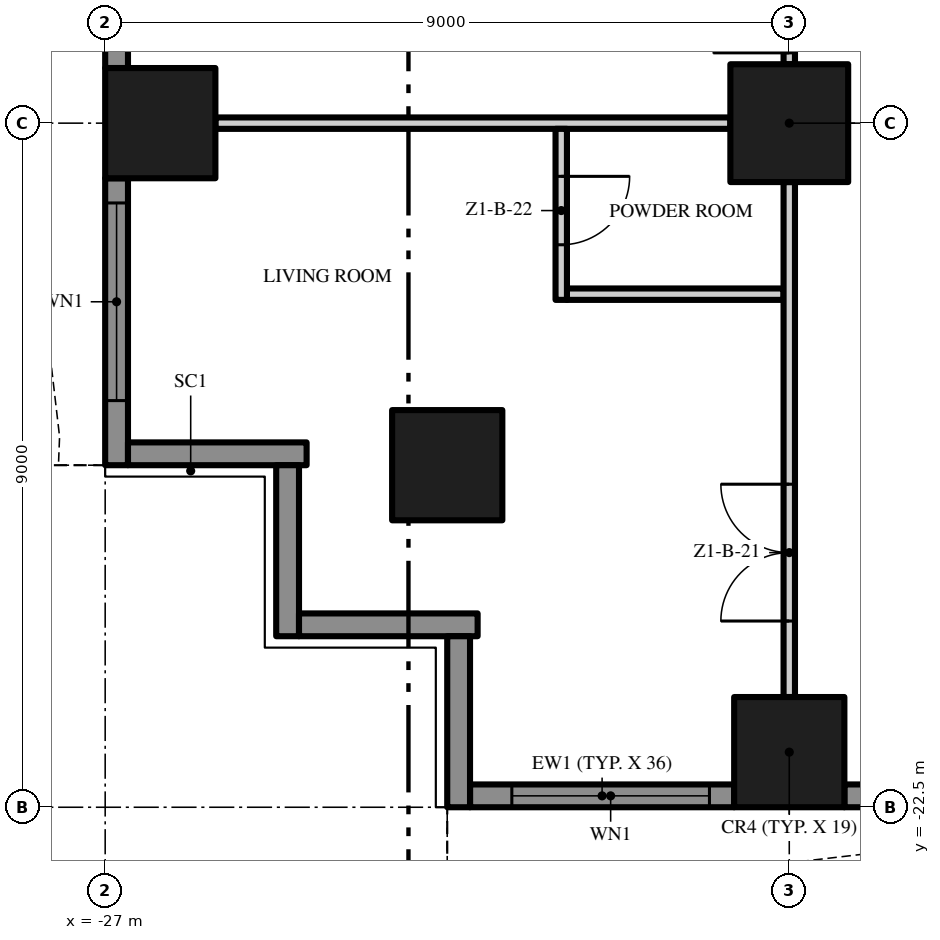
"""IFC4 building model, lengths in metres.
Left out: names, types, materials, properties, quantities, classifications, styles, units other than length and angle.
Written with IfcOpenShell. Run it as: python <this file> out.ifc"""

import sys

from ifc_helpers import new_model, si_unit, direction, frame, frame_2d, origin, origin_2d, place, context, subcontext, project, spatial, polyline, rectangle, outline, extrude, element, fill, save


model = new_model("IFC4")
c1 = context("Model", 3, precision=1e-05, world=origin(), true_north=direction((0.0, 1.0)))
c2 = subcontext(c1, "Body", "Model", "MODEL_VIEW")
j1 = project(units=[si_unit("LENGTHUNIT", "METRE"), si_unit("PLANEANGLEUNIT", "RADIAN")], contexts=[c1])
p1 = place(None, origin())
s1 = spatial("IfcSite", under=j1, at=p1, CompositionType="ELEMENT")
p2 = place(p1, origin())
s2 = spatial("IfcBuilding", under=s1, at=p2, CompositionType="ELEMENT")
p3 = place(p2, frame((0.0, 0.0, 26.4)))
s3 = spatial("IfcBuildingStorey", under=s2, at=p3, CompositionType="ELEMENT", Elevation=26.4)
p4 = place(p3, frame((-18.0, -13.5, 0.0), z_axis=(0.0, 0.0, 1.0), x_axis=(1.0, 0.0, 0.0)))
e1 = element("IfcColumn", 1, at=p4, inside=s3, PredefinedType="COLUMN", context=c2, shape_type="SweptSolid", body=[
    extrude(rectangle(XDim=1.55, YDim=1.55, at=origin_2d()), origin(), (0.0, 0.0, 1.0), 3.5),
])
for number, where, z_axis, x_axis in (
    (2, (-18.0, -21.775, 0.0), (0.0, 0.0, 1.0), (1.0, 0.0, 0.0)),
    (3, (-26.275, -13.5, 0.0), (0.0, 0.0, 1.0), (1.0, 0.0, 0.0)),
    (4, (-22.5, -18.0, 0.0), (0.0, 0.0, 1.0), (1.0, 0.0, 0.0)),
):
    element("IfcColumn", number, at=place(p3, frame(where, z_axis=z_axis, x_axis=x_axis)), inside=s3, PredefinedType="COLUMN", context=c2, shape_type="SweptSolid", body=[
        extrude(rectangle(XDim=1.45, YDim=1.45, at=origin_2d()), origin(), (0.0, 0.0, 1.0), 3.5),
    ])
p5 = place(p3, frame((-18.725, -22.35, 0.0), z_axis=(0.0, 0.0, 1.0), x_axis=(-1.0, 0.0, 0.0)))
e5 = element("IfcWall", 5, at=p5, inside=s3, PredefinedType="SOLIDWALL", context=c2, shape_type="SweptSolid", body=[
    extrude(rectangle(XDim=3.475, YDim=0.3, at=frame_2d((1.738, 0.0))), origin(), (0.0, 0.0, 1.0), 3.5),
])
p6 = place(p5, frame((0.325, 0.0, 0.45)))
e6 = element("IfcOpeningElement", 6, at=p6, cuts=e5, PredefinedType="OPENING", context=c2, shape_type="SweptSolid", body=[
    extrude(rectangle(XDim=2.6, YDim=2.65, at=frame_2d((1.3, 1.325))), frame((0.0, 0.16, 0.0), z_axis=(0.0, -1.0, 0.0), x_axis=(1.0, 0.0, 0.0)), (0.0, 0.0, 1.0), 0.32),
])
p7 = place(p3, frame((-9.725, -22.35, 0.0), z_axis=(0.0, 0.0, 1.0), x_axis=(-1.0, 0.0, 0.0)))
e7 = element("IfcWall", 7, at=p7, inside=s3, PredefinedType="SOLIDWALL", context=c2, shape_type="SweptSolid", body=[
    extrude(rectangle(XDim=7.55, YDim=0.3, at=frame_2d((3.775, 0.0))), origin(), (0.0, 0.0, 1.0), 3.5),
])
p8 = place(p7, frame((4.625, 0.0, 0.45)))
e8 = element("IfcOpeningElement", 8, at=p8, cuts=e7, PredefinedType="OPENING", context=c2, shape_type="SweptSolid", body=[
    extrude(rectangle(XDim=2.6, YDim=2.65, at=frame_2d((1.3, 1.325))), frame((0.0, 0.16, 0.0), z_axis=(0.0, -1.0, 0.0), x_axis=(1.0, 0.0, 0.0)), (0.0, 0.0, 1.0), 0.32),
])
p9 = place(p7, frame((0.325, 0.0, 0.0)))
e9 = element("IfcOpeningElement", 9, at=p9, cuts=e7, PredefinedType="OPENING", context=c2, shape_type="SweptSolid", body=[
    extrude(rectangle(XDim=2.6, YDim=2.4, at=frame_2d((1.3, 1.2))), frame((0.0, 0.16, 0.0), z_axis=(0.0, -1.0, 0.0), x_axis=(1.0, 0.0, 0.0)), (0.0, 0.0, 1.0), 0.32),
])
p10 = place(p3, frame((-26.85, -12.775, 0.0), z_axis=(0.0, 0.0, 1.0), x_axis=(0.0, 1.0, 0.0)))
e10 = element("IfcWall", 10, at=p10, inside=s3, PredefinedType="SOLIDWALL", context=c2, shape_type="SweptSolid", body=[
    extrude(rectangle(XDim=7.55, YDim=0.3, at=frame_2d((3.775, 0.0))), origin(), (0.0, 0.0, 1.0), 3.5),
])
p11 = place(p10, frame((4.625, 0.0, 0.45)))
e11 = element("IfcOpeningElement", 11, at=p11, cuts=e10, PredefinedType="OPENING", context=c2, shape_type="SweptSolid", body=[
    extrude(rectangle(XDim=2.6, YDim=2.65, at=frame_2d((1.3, 1.325))), frame((0.0, 0.16, 0.0), z_axis=(0.0, -1.0, 0.0), x_axis=(1.0, 0.0, 0.0)), (0.0, 0.0, 1.0), 0.32),
])
p12 = place(p10, frame((0.325, 0.0, 0.0)))
e12 = element("IfcOpeningElement", 12, at=p12, cuts=e10, PredefinedType="OPENING", context=c2, shape_type="SweptSolid", body=[
    extrude(rectangle(XDim=2.6, YDim=2.4, at=frame_2d((1.3, 1.2))), frame((0.0, 0.16, 0.0), z_axis=(0.0, -1.0, 0.0), x_axis=(1.0, 0.0, 0.0)), (0.0, 0.0, 1.0), 0.32),
])
p13 = place(p3, frame((-26.85, -18.0, 0.0), z_axis=(0.0, 0.0, 1.0), x_axis=(0.0, 1.0, 0.0)))
e13 = element("IfcWall", 13, at=p13, inside=s3, PredefinedType="SOLIDWALL", context=c2, shape_type="SweptSolid", body=[
    extrude(rectangle(XDim=3.775, YDim=0.3, at=frame_2d((1.887, 0.0))), origin(), (0.0, 0.0, 1.0), 3.5),
])
p14 = place(p13, frame((0.85, 0.0, 0.45)))
e14 = element("IfcOpeningElement", 14, at=p14, cuts=e13, PredefinedType="OPENING", context=c2, shape_type="SweptSolid", body=[
    extrude(rectangle(XDim=2.6, YDim=2.65, at=frame_2d((1.3, 1.325))), frame((0.0, 0.16, 0.0), z_axis=(0.0, -1.0, 0.0), x_axis=(1.0, 0.0, 0.0)), (0.0, 0.0, 1.0), 0.32),
])
p15 = place(p3, frame((-24.35, -17.85, 0.0), z_axis=(0.0, 0.0, 1.0), x_axis=(-1.0, 0.0, 0.0)))
e15 = element("IfcWall", 15, at=p15, inside=s3, PredefinedType="SOLIDWALL", context=c2, shape_type="SweptSolid", body=[
    extrude(rectangle(XDim=2.35, YDim=0.3, at=frame_2d((1.175, 0.0))), origin(), (0.0, 0.0, 1.0), 3.5),
])
p16 = place(p3, frame((-24.6, -20.25, 0.0), z_axis=(0.0, 0.0, 1.0), x_axis=(0.0, 1.0, 0.0)))
e16 = element("IfcWall", 16, at=p16, inside=s3, PredefinedType="SOLIDWALL", context=c2, shape_type="SweptSolid", body=[
    extrude(rectangle(XDim=2.25, YDim=0.3, at=frame_2d((1.125, 0.0))), origin(), (0.0, 0.0, 1.0), 3.5),
])
p17 = place(p3, frame((-22.1, -20.1, 0.0), z_axis=(0.0, 0.0, 1.0), x_axis=(-1.0, 0.0, 0.0)))
e17 = element("IfcWall", 17, at=p17, inside=s3, PredefinedType="SOLIDWALL", context=c2, shape_type="SweptSolid", body=[
    extrude(rectangle(XDim=2.35, YDim=0.3, at=frame_2d((1.175, 0.0))), origin(), (0.0, 0.0, 1.0), 3.5),
])
p18 = place(p3, frame((-22.35, -22.5, 0.0), z_axis=(0.0, 0.0, 1.0), x_axis=(0.0, 1.0, 0.0)))
e18 = element("IfcWall", 18, at=p18, inside=s3, PredefinedType="SOLIDWALL", context=c2, shape_type="SweptSolid", body=[
    extrude(rectangle(XDim=2.25, YDim=0.3, at=frame_2d((1.125, 0.0))), origin(), (0.0, 0.0, 1.0), 3.5),
])
p19 = place(p3, origin())
e19 = element("IfcWall", 19, at=p19, inside=s3, PredefinedType="USERDEFINED", context=c2, shape_type="SweptSolid", body=[
    extrude(outline(polyline([(-22.5, -25.149), (-21.0, -24.488), (-19.5, -23.755), (-18.0, -23.231), (-16.875, -23.1), (-16.5, -23.115), (-15.0, -23.451), (-13.5, -24.112), (-12.0, -24.845), (-10.5, -25.369), (-9.375, -25.5), (-9.0, -25.485), (-7.5, -25.149), (-6.0, -24.488), (-4.5, -23.755), (-3.0, -23.231), (-1.875, -23.1), (-1.5, -23.115), (0.0, -23.451), (1.5, -24.112), (3.0, -24.845), (4.5, -25.369), (5.625, -25.5), (6.0, -25.485), (7.5, -25.149), (9.0, -24.488), (10.5, -23.755), (12.0, -23.231), (13.125, -23.1), (13.5, -23.115), (15.0, -23.451), (16.5, -24.112), (18.0, -24.845), (19.5, -25.369), (20.625, -25.5), (21.0, -25.485), (22.5, -25.149), (22.445, -24.905), (20.967, -25.236), (20.635, -25.249), (19.556, -25.124), (18.096, -24.614), (16.605, -23.885), (15.079, -23.213), (13.533, -22.866), (13.115, -22.849), (11.944, -22.986), (10.404, -23.524), (8.895, -24.261), (7.421, -24.91), (5.967, -25.236), (5.635, -25.249), (4.556, -25.124), (3.096, -24.614), (1.605, -23.885), (0.079, -23.213), (-1.467, -22.866), (-1.885, -22.849), (-3.056, -22.986), (-4.596, -23.524), (-6.105, -24.261), (-7.579, -24.91), (-9.033, -25.236), (-9.365, -25.249), (-10.444, -25.124), (-11.904, -24.614), (-13.395, -23.885), (-14.921, -23.213), (-16.467, -22.866), (-16.885, -22.849), (-18.056, -22.986), (-19.596, -23.524), (-21.105, -24.261), (-22.601, -24.92), (-22.5, -25.149)])), origin(), (0.0, 0.0, 1.0), 0.9),
])
p20 = place(p3, origin())
e20 = element("IfcWall", 20, at=p20, inside=s3, PredefinedType="USERDEFINED", context=c2, shape_type="SweptSolid", body=[
    extrude(outline(polyline([(-29.649, 18.0), (-28.988, 16.5), (-28.255, 15.0), (-27.731, 13.5), (-27.6, 12.375), (-27.615, 12.0), (-27.951, 10.5), (-28.612, 9.0), (-29.345, 7.5), (-29.869, 6.0), (-30.0, 4.875), (-29.985, 4.5), (-29.649, 3.0), (-28.988, 1.5), (-28.255, 0.0), (-27.731, -1.5), (-27.6, -2.625), (-27.615, -3.0), (-27.951, -4.5), (-28.612, -6.0), (-29.345, -7.5), (-29.869, -9.0), (-30.0, -10.125), (-29.985, -10.5), (-29.649, -12.0), (-28.988, -13.5), (-28.255, -15.0), (-27.731, -16.5), (-27.6, -17.625), (-27.615, -18.0), (-27.365, -18.01), (-27.349, -17.615), (-27.486, -16.444), (-28.024, -14.904), (-28.761, -13.395), (-29.41, -11.921), (-29.736, -10.467), (-29.749, -10.135), (-29.624, -9.056), (-29.114, -7.596), (-28.385, -6.105), (-27.713, -4.579), (-27.366, -3.033), (-27.349, -2.615), (-27.486, -1.444), (-28.024, 0.096), (-28.761, 1.605), (-29.41, 3.079), (-29.736, 4.533), (-29.749, 4.865), (-29.624, 5.944), (-29.114, 7.404), (-28.385, 8.895), (-27.713, 10.421), (-27.366, 11.967), (-27.349, 12.385), (-27.486, 13.556), (-28.024, 15.096), (-28.761, 16.605), (-29.42, 18.101), (-29.649, 18.0)])), origin(), (0.0, 0.0, 1.0), 0.9),
])
p21 = place(p3, frame((-20.925, -15.75, 0.0), z_axis=(0.0, 0.0, 1.0), x_axis=(1.0, 0.0, 0.0)))
e21 = element("IfcWall", 21, at=p21, inside=s3, PredefinedType="PARTITIONING", context=c2, shape_type="SweptSolid", body=[
    extrude(rectangle(XDim=2.85, YDim=0.15, at=frame_2d((1.425, 0.0))), origin(), (0.0, 0.0, 1.0), 3.5),
])
p22 = place(p3, frame((-25.55, -13.5, 0.0), z_axis=(0.0, 0.0, 1.0), x_axis=(1.0, 0.0, 0.0)))
e22 = element("IfcWall", 22, at=p22, inside=s3, PredefinedType="PARTITIONING", context=c2, shape_type="SweptSolid", body=[
    extrude(rectangle(XDim=6.775, YDim=0.15, at=frame_2d((3.388, 0.0))), origin(), (0.0, 0.0, 1.0), 3.5),
])
p23 = place(p3, frame((-21.0, -13.575, 0.0), z_axis=(0.0, 0.0, 1.0), x_axis=(0.0, -1.0, 0.0)))
e23 = element("IfcWall", 23, at=p23, inside=s3, PredefinedType="PARTITIONING", context=c2, shape_type="SweptSolid", body=[
    extrude(rectangle(XDim=2.25, YDim=0.15, at=frame_2d((1.125, 0.0))), origin(), (0.0, 0.0, 1.0), 3.5),
])
p24 = place(p23, frame((0.625, 0.0, 0.0)))
e24 = element("IfcOpeningElement", 24, at=p24, cuts=e23, PredefinedType="OPENING", context=c2, shape_type="SweptSolid", body=[
    extrude(rectangle(XDim=0.9, YDim=2.1, at=frame_2d((0.45, 1.05))), frame((0.0, 0.085, 0.0), z_axis=(0.0, -1.0, 0.0), x_axis=(1.0, 0.0, 0.0)), (0.0, 0.0, 1.0), 0.17),
])
p25 = place(p3, frame((-18.0, -21.05, 0.0), z_axis=(0.0, 0.0, 1.0), x_axis=(0.0, 1.0, 0.0)))
e25 = element("IfcWall", 25, at=p25, inside=s3, PredefinedType="PARTITIONING", context=c2, shape_type="SweptSolid", body=[
    extrude(rectangle(XDim=6.775, YDim=0.15, at=frame_2d((3.388, 0.0))), origin(), (0.0, 0.0, 1.0), 3.5),
])
p26 = place(p25, frame((1.0, 0.0, 0.0)))
e26 = element("IfcOpeningElement", 26, at=p26, cuts=e25, PredefinedType="OPENING", context=c2, shape_type="SweptSolid", body=[
    extrude(rectangle(XDim=1.8, YDim=2.4, at=frame_2d((0.9, 1.2))), frame((0.0, 0.085, 0.0), z_axis=(0.0, -1.0, 0.0), x_axis=(1.0, 0.0, 0.0)), (0.0, 0.0, 1.0), 0.17),
])
p27 = place(p3, frame((-18.0, -12.725, 0.0), z_axis=(0.0, 0.0, 1.0), x_axis=(0.0, 1.0, 0.0)))
e27 = element("IfcWall", 27, at=p27, inside=s3, PredefinedType="PARTITIONING", context=c2, shape_type="SweptSolid", body=[
    extrude(rectangle(XDim=7.45, YDim=0.15, at=frame_2d((3.725, 0.0))), origin(), (0.0, 0.0, 1.0), 3.5),
])
p28 = place(p27, frame((0.15, 0.0, 0.0)))
e28 = element("IfcOpeningElement", 28, at=p28, cuts=e27, PredefinedType="OPENING", context=c2, shape_type="SweptSolid", body=[
    extrude(rectangle(XDim=1.0, YDim=2.4, at=frame_2d((0.5, 1.2))), frame((0.0, 0.085, 0.0), z_axis=(0.0, -1.0, 0.0), x_axis=(1.0, 0.0, 0.0)), (0.0, 0.0, 1.0), 0.17),
])
p29 = place(p27, frame((6.3, 0.0, 0.0)))
e29 = element("IfcOpeningElement", 29, at=p29, cuts=e27, PredefinedType="OPENING", context=c2, shape_type="SweptSolid", body=[
    extrude(rectangle(XDim=1.0, YDim=2.4, at=frame_2d((0.5, 1.2))), frame((0.0, 0.085, 0.0), z_axis=(0.0, -1.0, 0.0), x_axis=(1.0, 0.0, 0.0)), (0.0, 0.0, 1.0), 0.17),
])
p30 = place(p6, origin())
e30 = element("IfcWindow", 30, at=p30, inside=s3, PartitioningType="SINGLE_PANEL", PredefinedType="WINDOW", context=c2, shape_type="SweptSolid", body=[
    extrude(rectangle(XDim=2.6, YDim=2.65, at=frame_2d((1.3, 1.325))), frame((0.0, 0.03, 0.0), z_axis=(0.0, -1.0, 0.0), x_axis=(1.0, 0.0, 0.0)), (0.0, 0.0, 1.0), 0.06),
])
fill(e6, e30)
p31 = place(p14, origin())
e31 = element("IfcWindow", 31, at=p31, inside=s3, PartitioningType="SINGLE_PANEL", PredefinedType="WINDOW", context=c2, shape_type="SweptSolid", body=[
    extrude(rectangle(XDim=2.6, YDim=2.65, at=frame_2d((1.3, 1.325))), frame((0.0, 0.03, 0.0), z_axis=(0.0, -1.0, 0.0), x_axis=(1.0, 0.0, 0.0)), (0.0, 0.0, 1.0), 0.06),
])
fill(e14, e31)
p32 = place(p26, origin())
e32 = element("IfcDoor", 32, at=p32, inside=s3, OperationType="DOUBLE_DOOR_SINGLE_SWING", PredefinedType="DOOR", context=c2, shape_type="SweptSolid", body=[
    extrude(rectangle(XDim=1.8, YDim=2.4, at=frame_2d((0.9, 1.2))), frame((0.0, 0.025, 0.0), z_axis=(0.0, -1.0, 0.0), x_axis=(1.0, 0.0, 0.0)), (0.0, 0.0, 1.0), 0.05),
])
fill(e26, e32)
p33 = place(p24, origin())
e33 = element("IfcDoor", 33, at=p33, inside=s3, OperationType="SINGLE_SWING_LEFT", PredefinedType="DOOR", context=c2, shape_type="SweptSolid", body=[
    extrude(rectangle(XDim=0.9, YDim=2.1, at=frame_2d((0.45, 1.05))), frame((0.0, 0.025, 0.0), z_axis=(0.0, -1.0, 0.0), x_axis=(1.0, 0.0, 0.0)), (0.0, 0.0, 1.0), 0.05),
])
fill(e24, e33)
save(model, sys.argv[1])
